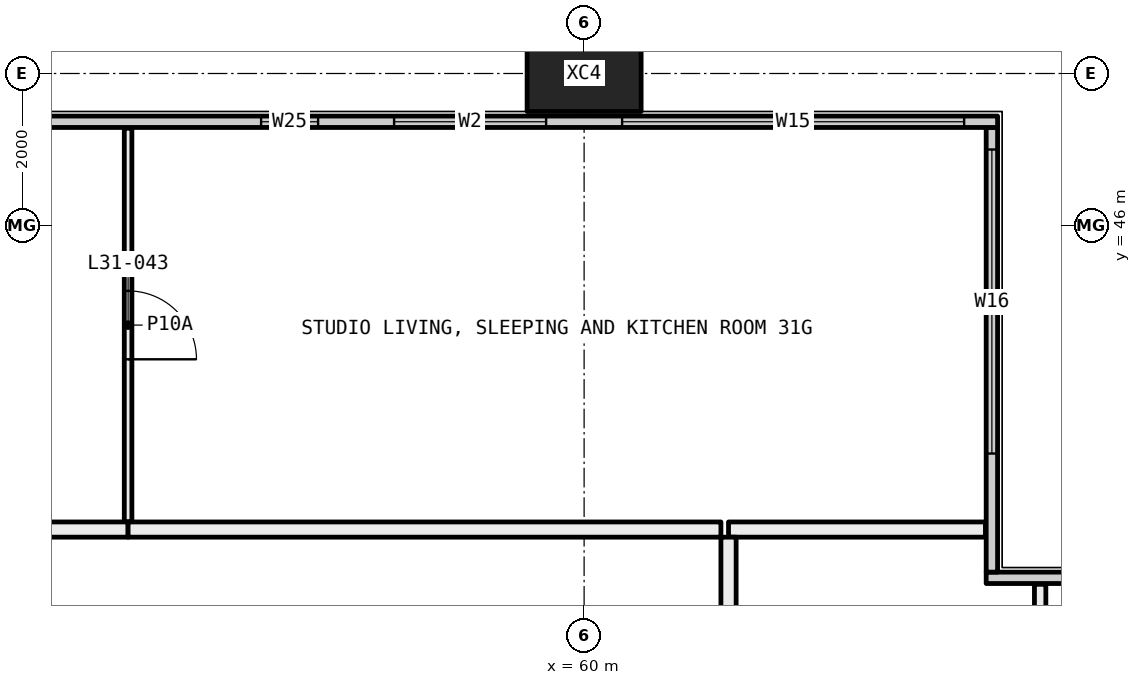
"""IFC4 building model, lengths in metres.
Left out: names, types, materials, properties, quantities, classifications, styles, units other than length and angle.
Written with IfcOpenShell. Run it as: python <this file> out.ifc"""

import sys

from ifc_helpers import new_model, si_unit, direction, frame, frame_2d, origin, origin_2d, place, context, subcontext, project, spatial, rectangle, hollow_rectangle, extrude, element, fill, save


model = new_model("IFC4")
c1 = context("Model", 3, precision=1e-05, world=origin(), true_north=direction((0.0, 1.0)))
c2 = subcontext(c1, "Body", "Model", "MODEL_VIEW")
j1 = project(units=[si_unit("LENGTHUNIT", "METRE"), si_unit("PLANEANGLEUNIT", "RADIAN")], contexts=[c1])
p1 = place(None, origin())
s1 = spatial("IfcSite", under=j1, at=p1, CompositionType="ELEMENT")
p2 = place(p1, origin())
s2 = spatial("IfcBuilding", under=s1, at=p2, CompositionType="ELEMENT")
p3 = place(p2, frame((0.0, 0.0, 120.75)))
s3 = spatial("IfcBuildingStorey", under=s2, at=p3, CompositionType="ELEMENT", Elevation=120.75)
p4 = place(p3, frame((60.0, 48.0, -0.4), z_axis=(0.0, 0.0, 1.0), x_axis=(1.0, 0.0, 0.0)))
e1 = element("IfcColumn", 1, at=p4, inside=s3, PredefinedType="COLUMN", context=c2, shape_type="SweptSolid", body=[
    extrude(hollow_rectangle(XDim=1.5, YDim=1.0, WallThickness=0.06, at=origin_2d()), origin(), (0.0, 0.0, 1.0), 3.45),
])
p5 = place(p3, frame((65.29, 41.365, 0.0), z_axis=(0.0, 0.0, 1.0), x_axis=(1.0, 0.0, 0.0)))
e2 = element("IfcWall", 2, at=p5, inside=s3, PredefinedType="ELEMENTEDWALL", context=c2, shape_type="SweptSolid", body=[
    extrude(rectangle(XDim=6.15, YDim=0.15, at=frame_2d((3.075, 0.0))), origin(), (0.0, 0.0, 1.0), 3.05),
])
p6 = place(p5, frame((1.71, 0.0, 0.45)))
e3 = element("IfcOpeningElement", 3, at=p6, cuts=e2, PredefinedType="OPENING", context=c2, shape_type="SweptSolid", body=[
    extrude(rectangle(XDim=4.0, YDim=2.55, at=frame_2d((2.0, 1.275))), frame((0.0, 0.085, 0.0), z_axis=(0.0, -1.0, 0.0), x_axis=(1.0, 0.0, 0.0)), (0.0, 0.0, 1.0), 0.17),
])
p7 = place(p3, frame((65.365, 41.44, 0.0), z_axis=(0.0, 0.0, 1.0), x_axis=(0.0, 1.0, 0.0)))
e4 = element("IfcWall", 4, at=p7, inside=s3, PredefinedType="ELEMENTEDWALL", context=c2, shape_type="SweptSolid", body=[
    extrude(rectangle(XDim=5.85, YDim=0.15, at=frame_2d((2.925, 0.0))), origin(), (0.0, 0.0, 1.0), 3.05),
])
p8 = place(p7, frame((1.56, 0.0, 0.45)))
e5 = element("IfcOpeningElement", 5, at=p8, cuts=e4, PredefinedType="OPENING", context=c2, shape_type="SweptSolid", body=[
    extrude(rectangle(XDim=4.0, YDim=2.55, at=frame_2d((2.0, 1.275))), frame((0.0, 0.085, 0.0), z_axis=(0.0, -1.0, 0.0), x_axis=(1.0, 0.0, 0.0)), (0.0, 0.0, 1.0), 0.17),
])
p9 = place(p3, frame((6.56, 47.365, 0.0), z_axis=(0.0, 0.0, 1.0), x_axis=(1.0, 0.0, 0.0)))
e6 = element("IfcWall", 6, at=p9, inside=s3, PredefinedType="ELEMENTEDWALL", context=c2, shape_type="SweptSolid", body=[
    extrude(rectangle(XDim=58.88, YDim=0.15, at=frame_2d((29.44, 0.0))), origin(), (0.0, 0.0, 1.0), 3.05),
])
p10 = place(p9, frame((0.44, 0.0, 0.45)))
e7 = element("IfcOpeningElement", 7, at=p10, cuts=e6, PredefinedType="OPENING", context=c2, shape_type="SweptSolid", body=[
    extrude(rectangle(XDim=4.5, YDim=2.55, at=frame_2d((2.25, 1.275))), frame((0.0, 0.085, 0.0), z_axis=(0.0, -1.0, 0.0), x_axis=(1.0, 0.0, 0.0)), (0.0, 0.0, 1.0), 0.17),
])
p11 = place(p9, frame((5.94, 0.0, 0.45)))
e8 = element("IfcOpeningElement", 8, at=p11, cuts=e6, PredefinedType="OPENING", context=c2, shape_type="SweptSolid", body=[
    extrude(rectangle(XDim=3.75, YDim=2.55, at=frame_2d((1.875, 1.275))), frame((0.0, 0.085, 0.0), z_axis=(0.0, -1.0, 0.0), x_axis=(1.0, 0.0, 0.0)), (0.0, 0.0, 1.0), 0.17),
])
p12 = place(p9, frame((13.19, 0.0, 0.45)))
e9 = element("IfcOpeningElement", 9, at=p12, cuts=e6, PredefinedType="OPENING", context=c2, shape_type="SweptSolid", body=[
    extrude(rectangle(XDim=3.75, YDim=2.55, at=frame_2d((1.875, 1.275))), frame((0.0, 0.085, 0.0), z_axis=(0.0, -1.0, 0.0), x_axis=(1.0, 0.0, 0.0)), (0.0, 0.0, 1.0), 0.17),
])
p13 = place(p9, frame((17.94, 0.0, 0.45)))
e10 = element("IfcOpeningElement", 10, at=p13, cuts=e6, PredefinedType="OPENING", context=c2, shape_type="SweptSolid", body=[
    extrude(rectangle(XDim=3.75, YDim=2.55, at=frame_2d((1.875, 1.275))), frame((0.0, 0.085, 0.0), z_axis=(0.0, -1.0, 0.0), x_axis=(1.0, 0.0, 0.0)), (0.0, 0.0, 1.0), 0.17),
])
p14 = place(p9, frame((25.19, 0.0, 0.45)))
e11 = element("IfcOpeningElement", 11, at=p14, cuts=e6, PredefinedType="OPENING", context=c2, shape_type="SweptSolid", body=[
    extrude(rectangle(XDim=0.75, YDim=2.55, at=frame_2d((0.375, 1.275))), frame((0.0, 0.085, 0.0), z_axis=(0.0, -1.0, 0.0), x_axis=(1.0, 0.0, 0.0)), (0.0, 0.0, 1.0), 0.17),
])
p15 = place(p9, frame((26.94, 0.0, 0.45)))
e12 = element("IfcOpeningElement", 12, at=p15, cuts=e6, PredefinedType="OPENING", context=c2, shape_type="SweptSolid", body=[
    extrude(rectangle(XDim=2.0, YDim=2.55, at=frame_2d((1.0, 1.275))), frame((0.0, 0.085, 0.0), z_axis=(0.0, -1.0, 0.0), x_axis=(1.0, 0.0, 0.0)), (0.0, 0.0, 1.0), 0.17),
])
p16 = place(p9, frame((29.94, 0.0, 0.45)))
e13 = element("IfcOpeningElement", 13, at=p16, cuts=e6, PredefinedType="OPENING", context=c2, shape_type="SweptSolid", body=[
    extrude(rectangle(XDim=3.75, YDim=2.55, at=frame_2d((1.875, 1.275))), frame((0.0, 0.085, 0.0), z_axis=(0.0, -1.0, 0.0), x_axis=(1.0, 0.0, 0.0)), (0.0, 0.0, 1.0), 0.17),
])
p17 = place(p9, frame((37.19, 0.0, 0.45)))
e14 = element("IfcOpeningElement", 14, at=p17, cuts=e6, PredefinedType="OPENING", context=c2, shape_type="SweptSolid", body=[
    extrude(rectangle(XDim=3.75, YDim=2.55, at=frame_2d((1.875, 1.275))), frame((0.0, 0.085, 0.0), z_axis=(0.0, -1.0, 0.0), x_axis=(1.0, 0.0, 0.0)), (0.0, 0.0, 1.0), 0.17),
])
p18 = place(p9, frame((41.94, 0.0, 0.45)))
e15 = element("IfcOpeningElement", 15, at=p18, cuts=e6, PredefinedType="OPENING", context=c2, shape_type="SweptSolid", body=[
    extrude(rectangle(XDim=3.75, YDim=2.55, at=frame_2d((1.875, 1.275))), frame((0.0, 0.085, 0.0), z_axis=(0.0, -1.0, 0.0), x_axis=(1.0, 0.0, 0.0)), (0.0, 0.0, 1.0), 0.17),
])
p19 = place(p9, frame((49.19, 0.0, 0.45)))
e16 = element("IfcOpeningElement", 16, at=p19, cuts=e6, PredefinedType="OPENING", context=c2, shape_type="SweptSolid", body=[
    extrude(rectangle(XDim=0.75, YDim=2.55, at=frame_2d((0.375, 1.275))), frame((0.0, 0.085, 0.0), z_axis=(0.0, -1.0, 0.0), x_axis=(1.0, 0.0, 0.0)), (0.0, 0.0, 1.0), 0.17),
])
p20 = place(p9, frame((50.94, 0.0, 0.45)))
e17 = element("IfcOpeningElement", 17, at=p20, cuts=e6, PredefinedType="OPENING", context=c2, shape_type="SweptSolid", body=[
    extrude(rectangle(XDim=2.0, YDim=2.55, at=frame_2d((1.0, 1.275))), frame((0.0, 0.085, 0.0), z_axis=(0.0, -1.0, 0.0), x_axis=(1.0, 0.0, 0.0)), (0.0, 0.0, 1.0), 0.17),
])
p21 = place(p9, frame((53.94, 0.0, 0.45)))
e18 = element("IfcOpeningElement", 18, at=p21, cuts=e6, PredefinedType="OPENING", context=c2, shape_type="SweptSolid", body=[
    extrude(rectangle(XDim=4.5, YDim=2.55, at=frame_2d((2.25, 1.275))), frame((0.0, 0.085, 0.0), z_axis=(0.0, -1.0, 0.0), x_axis=(1.0, 0.0, 0.0)), (0.0, 0.0, 1.0), 0.17),
])
p22 = place(p3, frame((66.0, 41.28, 0.0), z_axis=(0.0, 0.0, 1.0), x_axis=(0.0, -1.0, 0.0)))
e19 = element("IfcWall", 19, at=p22, inside=s3, PredefinedType="PARTITIONING", context=c2, shape_type="SweptSolid", body=[
    extrude(rectangle(XDim=3.78, YDim=0.15, at=frame_2d((1.89, 0.0))), origin(), (0.0, 0.0, 1.0), 3.05),
])
p23 = place(p3, frame((65.28, 42.0, 0.0), z_axis=(0.0, 0.0, 1.0), x_axis=(-1.0, 0.0, 0.0)))
e20 = element("IfcWall", 20, at=p23, inside=s3, PredefinedType="PARTITIONING", context=c2, shape_type="SweptSolid", body=[
    extrude(rectangle(XDim=3.38, YDim=0.2, at=frame_2d((1.69, 0.0))), origin(), (0.0, 0.0, 1.0), 3.05),
])
p24 = place(p3, frame((61.9, 41.9, 0.0), z_axis=(0.0, 0.0, 1.0), x_axis=(0.0, -1.0, 0.0)))
e21 = element("IfcWall", 21, at=p24, inside=s3, PredefinedType="PARTITIONING", context=c2, shape_type="SweptSolid", body=[
    extrude(rectangle(XDim=4.4, YDim=0.2, at=frame_2d((2.2, 0.0))), origin(), (0.0, 0.0, 1.0), 3.05),
])
p25 = place(p3, frame((54.0, 42.1, 0.0), z_axis=(0.0, 0.0, 1.0), x_axis=(0.0, 1.0, 0.0)))
e22 = element("IfcWall", 22, at=p25, inside=s3, PredefinedType="PARTITIONING", context=c2, shape_type="SweptSolid", body=[
    extrude(rectangle(XDim=5.18, YDim=0.1, at=frame_2d((2.59, 0.0))), origin(), (0.0, 0.0, 1.0), 3.05),
])
p26 = place(p25, frame((2.14, 0.0, 0.0)))
e23 = element("IfcOpeningElement", 23, at=p26, cuts=e22, PredefinedType="OPENING", context=c2, shape_type="SweptSolid", body=[
    extrude(rectangle(XDim=0.9, YDim=2.1, at=frame_2d((0.45, 1.05))), frame((0.0, 0.06, 0.0), z_axis=(0.0, -1.0, 0.0), x_axis=(1.0, 0.0, 0.0)), (0.0, 0.0, 1.0), 0.12),
])
p27 = place(p3, frame((48.0, 42.0, 0.0), z_axis=(0.0, 0.0, 1.0), x_axis=(1.0, 0.0, 0.0)))
e24 = element("IfcWall", 24, at=p27, inside=s3, PredefinedType="PARTITIONING", context=c2, shape_type="SweptSolid", body=[
    extrude(rectangle(XDim=6.0, YDim=0.2, at=frame_2d((3.0, 0.0))), origin(), (0.0, 0.0, 1.0), 3.05),
])
p28 = place(p27, frame((2.5, 0.0, 0.0)))
e25 = element("IfcOpeningElement", 25, at=p28, cuts=e24, PredefinedType="OPENING", context=c2, shape_type="SweptSolid", body=[
    extrude(rectangle(XDim=1.0, YDim=2.1, at=frame_2d((0.5, 1.05))), frame((0.0, 0.11, 0.0), z_axis=(0.0, -1.0, 0.0), x_axis=(1.0, 0.0, 0.0)), (0.0, 0.0, 1.0), 0.22),
])
p29 = place(p3, frame((54.0, 42.0, 0.0), z_axis=(0.0, 0.0, 1.0), x_axis=(1.0, 0.0, 0.0)))
e26 = element("IfcWall", 26, at=p29, inside=s3, PredefinedType="PARTITIONING", context=c2, shape_type="SweptSolid", body=[
    extrude(rectangle(XDim=7.8, YDim=0.2, at=frame_2d((3.9, 0.0))), origin(), (0.0, 0.0, 1.0), 3.05),
])
p30 = place(p8, origin())
e27 = element("IfcWindow", 27, at=p30, inside=s3, PartitioningType="SINGLE_PANEL", PredefinedType="WINDOW", context=c2, shape_type="SweptSolid", body=[
    extrude(rectangle(XDim=4.0, YDim=2.55, at=frame_2d((2.0, 1.275))), frame((0.0, 0.03, 0.0), z_axis=(0.0, -1.0, 0.0), x_axis=(1.0, 0.0, 0.0)), (0.0, 0.0, 1.0), 0.06),
])
fill(e5, e27)
p31 = place(p19, origin())
e28 = element("IfcWindow", 28, at=p31, inside=s3, PartitioningType="SINGLE_PANEL", PredefinedType="WINDOW", context=c2, shape_type="SweptSolid", body=[
    extrude(rectangle(XDim=0.75, YDim=2.55, at=frame_2d((0.375, 1.275))), frame((0.0, 0.03, 0.0), z_axis=(0.0, -1.0, 0.0), x_axis=(1.0, 0.0, 0.0)), (0.0, 0.0, 1.0), 0.06),
])
fill(e16, e28)
p32 = place(p20, origin())
e29 = element("IfcWindow", 29, at=p32, inside=s3, PartitioningType="SINGLE_PANEL", PredefinedType="WINDOW", context=c2, shape_type="SweptSolid", body=[
    extrude(rectangle(XDim=2.0, YDim=2.55, at=frame_2d((1.0, 1.275))), frame((0.0, 0.03, 0.0), z_axis=(0.0, -1.0, 0.0), x_axis=(1.0, 0.0, 0.0)), (0.0, 0.0, 1.0), 0.06),
])
fill(e17, e29)
p33 = place(p21, origin())
e30 = element("IfcWindow", 30, at=p33, inside=s3, PartitioningType="SINGLE_PANEL", PredefinedType="WINDOW", context=c2, shape_type="SweptSolid", body=[
    extrude(rectangle(XDim=4.5, YDim=2.55, at=frame_2d((2.25, 1.275))), frame((0.0, 0.03, 0.0), z_axis=(0.0, -1.0, 0.0), x_axis=(1.0, 0.0, 0.0)), (0.0, 0.0, 1.0), 0.06),
])
fill(e18, e30)
p34 = place(p26, frame((0.9, 0.0, 0.0), x_axis=(-1.0, 0.0, 0.0)))
e31 = element("IfcDoor", 31, at=p34, inside=s3, OperationType="SINGLE_SWING_LEFT", PredefinedType="DOOR", context=c2, shape_type="SweptSolid", body=[
    extrude(rectangle(XDim=0.9, YDim=2.1, at=frame_2d((0.45, 1.05))), frame((0.0, 0.025, 0.0), z_axis=(0.0, -1.0, 0.0), x_axis=(1.0, 0.0, 0.0)), (0.0, 0.0, 1.0), 0.05),
])
fill(e23, e31)
save(model, sys.argv[1])
